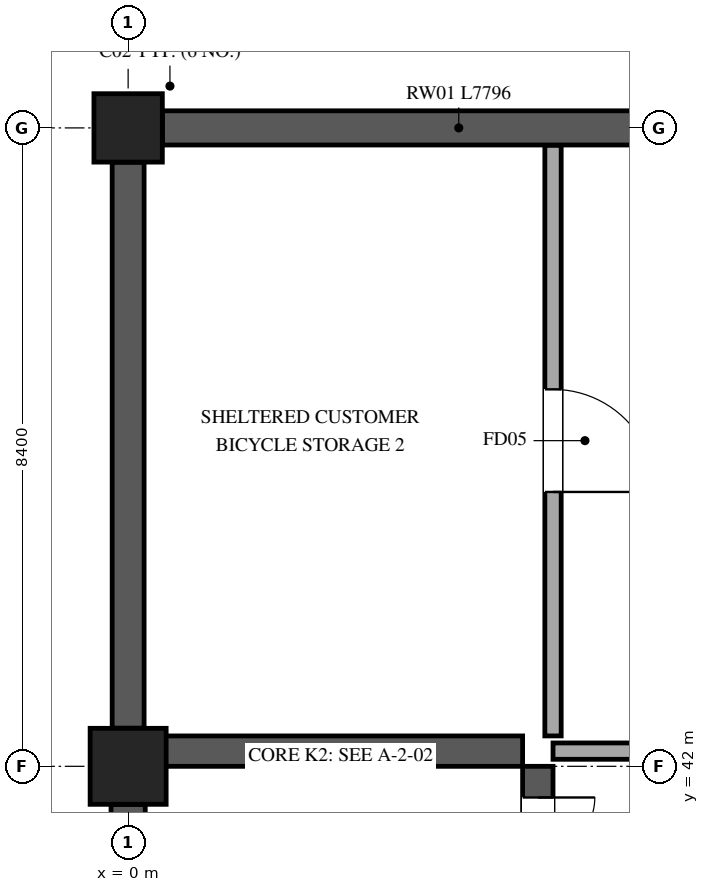
"""IFC4 building model, lengths in metres.
Left out: names, types, materials, properties, quantities, classifications, styles, units other than length and angle.
Written with IfcOpenShell. Run it as: python <this file> out.ifc"""

import sys

from ifc_helpers import new_model, si_unit, direction, frame, frame_2d, origin, origin_2d, place, context, subcontext, project, spatial, rectangle, extrude, element, fill, save


model = new_model("IFC4")
c1 = context("Model", 3, precision=1e-05, world=origin(), true_north=direction((0.0, 1.0)))
c2 = subcontext(c1, "Body", "Model", "MODEL_VIEW")
j1 = project(units=[si_unit("LENGTHUNIT", "METRE"), si_unit("PLANEANGLEUNIT", "RADIAN")], contexts=[c1])
p1 = place(None, origin())
s1 = spatial("IfcSite", under=j1, at=p1, CompositionType="ELEMENT")
p2 = place(p1, origin())
s2 = spatial("IfcBuilding", under=s1, at=p2, CompositionType="ELEMENT")
p3 = place(p2, frame((0.0, 0.0, -4.8)))
s3 = spatial("IfcBuildingStorey", under=s2, at=p3, CompositionType="ELEMENT", Elevation=-4.8)
p4 = place(p3, frame((0.0, 42.0, 0.0), z_axis=(0.0, 0.0, 1.0), x_axis=(1.0, 0.0, 0.0)))
e1 = element("IfcColumn", 1, at=p4, inside=s3, PredefinedType="COLUMN", context=c2, shape_type="SweptSolid", body=[
    extrude(rectangle(XDim=1.0, YDim=1.0, at=origin_2d()), origin(), (0.0, 0.0, 1.0), 4.8),
])
p5 = place(p3, frame((0.0, 50.4, 0.0), z_axis=(0.0, 0.0, 1.0), x_axis=(1.0, 0.0, 0.0)))
e2 = element("IfcColumn", 2, at=p5, inside=s3, PredefinedType="COLUMN", context=c2, shape_type="SweptSolid", body=[
    extrude(rectangle(XDim=0.9, YDim=0.9, at=origin_2d()), origin(), (0.0, 0.0, 1.0), 4.8),
])
p6 = place(p3, frame((0.0, 34.102, 0.0), z_axis=(0.0, 0.0, 1.0), x_axis=(0.0, 1.0, 0.0)))
e3 = element("IfcWall", 3, at=p6, inside=s3, PredefinedType="USERDEFINED", context=c2, shape_type="SweptSolid", body=[
    extrude(rectangle(XDim=7.396, YDim=0.45, at=frame_2d((3.698, 0.0))), origin(), (0.0, 0.0, 1.0), 4.46),
])
p7 = place(p3, frame((0.0, 42.502, 0.0), z_axis=(0.0, 0.0, 1.0), x_axis=(0.0, 1.0, 0.0)))
e4 = element("IfcWall", 4, at=p7, inside=s3, PredefinedType="USERDEFINED", context=c2, shape_type="SweptSolid", body=[
    extrude(rectangle(XDim=7.446, YDim=0.42, at=frame_2d((3.723, 0.0))), origin(), (0.0, 0.0, 1.0), 4.58),
])
p8 = place(p3, frame((0.452, 50.4, 0.0), z_axis=(0.0, 0.0, 1.0), x_axis=(1.0, 0.0, 0.0)))
e5 = element("IfcWall", 5, at=p8, inside=s3, PredefinedType="USERDEFINED", context=c2, shape_type="SweptSolid", body=[
    extrude(rectangle(XDim=7.796, YDim=0.45, at=frame_2d((3.898, 0.0))), origin(), (0.0, 0.0, 1.0), 4.58),
])
p9 = place(p3, frame((5.39, 42.0, 0.0), z_axis=(0.0, 0.0, 1.0), x_axis=(0.0, -1.0, 0.0)))
e6 = element("IfcWall", 6, at=p9, inside=s3, PredefinedType="SHEAR", context=c2, shape_type="SweptSolid", body=[
    extrude(rectangle(XDim=10.0, YDim=0.4, at=frame_2d((5.0, 0.0))), origin(), (0.0, 0.0, 1.0), 4.8),
])
p10 = place(p9, frame((0.41, 0.0, 0.0)))
e7 = element("IfcOpeningElement", 7, at=p10, cuts=e6, PredefinedType="OPENING", context=c2, shape_type="SweptSolid", body=[
    extrude(rectangle(XDim=1.5, YDim=2.2, at=frame_2d((0.75, 1.1))), frame((0.0, 0.21, 0.0), z_axis=(0.0, -1.0, 0.0), x_axis=(1.0, 0.0, 0.0)), (0.0, 0.0, 1.0), 0.42),
])
p11 = place(p3, frame((0.4, 42.2, 0.0), z_axis=(0.0, 0.0, 1.0), x_axis=(1.0, 0.0, 0.0)))
e8 = element("IfcWall", 8, at=p11, inside=s3, PredefinedType="SHEAR", context=c2, shape_type="SweptSolid", body=[
    extrude(rectangle(XDim=4.79, YDim=0.4, at=frame_2d((2.395, 0.0))), origin(), (0.0, 0.0, 1.0), 4.8),
])
p12 = place(p3, frame((5.59, 42.2, 0.0), z_axis=(0.0, 0.0, 1.0), x_axis=(1.0, 0.0, 0.0)))
e9 = element("IfcWall", 9, at=p12, inside=s3, PredefinedType="PARTITIONING", context=c2, shape_type="SweptSolid", body=[
    extrude(rectangle(XDim=2.6, YDim=0.215, at=frame_2d((1.3, 0.0))), origin(), (0.0, 0.0, 1.0), 4.44),
])
p13 = place(p3, frame((5.59, 50.17, 0.0), z_axis=(0.0, 0.0, 1.0), x_axis=(0.0, -1.0, 0.0)))
e10 = element("IfcWall", 10, at=p13, inside=s3, PredefinedType="PARTITIONING", context=c2, shape_type="SweptSolid", body=[
    extrude(rectangle(XDim=7.77, YDim=0.215, at=frame_2d((3.885, 0.0))), origin(), (0.0, 0.0, 1.0), 3.65),
])
p14 = place(p13, frame((3.21, 0.0, 0.0)))
e11 = element("IfcOpeningElement", 11, at=p14, cuts=e10, PredefinedType="OPENING", context=c2, shape_type="SweptSolid", body=[
    extrude(rectangle(XDim=1.35, YDim=2.2, at=frame_2d((0.675, 1.1))), frame((0.0, 0.118, 0.0), z_axis=(0.0, -1.0, 0.0), x_axis=(1.0, 0.0, 0.0)), (0.0, 0.0, 1.0), 0.235),
])
p15 = place(p10, origin())
e12 = element("IfcDoor", 12, at=p15, inside=s3, OperationType="DOUBLE_DOOR_SINGLE_SWING", PredefinedType="DOOR", context=c2, shape_type="SweptSolid", body=[
    extrude(rectangle(XDim=1.5, YDim=2.2, at=frame_2d((0.75, 1.1))), frame((0.0, 0.025, 0.0), z_axis=(0.0, -1.0, 0.0), x_axis=(1.0, 0.0, 0.0)), (0.0, 0.0, 1.0), 0.05),
])
fill(e7, e12)
p16 = place(p14, origin())
e13 = element("IfcDoor", 13, at=p16, inside=s3, OperationType="SINGLE_SWING_RIGHT", PredefinedType="DOOR", context=c2, shape_type="SweptSolid", body=[
    extrude(rectangle(XDim=1.35, YDim=2.2, at=frame_2d((0.675, 1.1))), frame((0.0, 0.025, 0.0), z_axis=(0.0, -1.0, 0.0), x_axis=(1.0, 0.0, 0.0)), (0.0, 0.0, 1.0), 0.05),
])
fill(e11, e13)
save(model, sys.argv[1])
